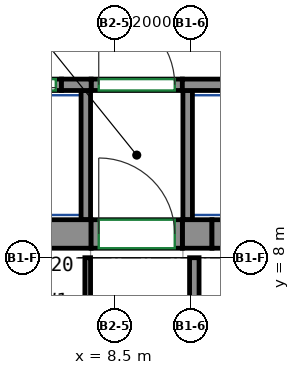
"""IFC4 building model, lengths in metres.
Left out: names, types, materials, properties, quantities, classifications, styles, units other than length and angle.
Written with IfcOpenShell. Run it as: python <this file> out.ifc"""

import sys

from ifc_helpers import new_model, si_unit, direction, frame, frame_2d, origin, place, context, subcontext, project, spatial, rectangle, extrude, source, transform, mapped, element, fill, save


model = new_model("IFC4")
c1 = context("Model", 3, precision=1e-05, world=origin(), true_north=direction((0.0, 1.0)))
c2 = subcontext(c1, "Body", "Model", "MODEL_VIEW")
j1 = project(units=[si_unit("LENGTHUNIT", "METRE"), si_unit("PLANEANGLEUNIT", "RADIAN")], contexts=[c1])
p1 = place(None, origin())
s1 = spatial("IfcSite", under=j1, at=p1, CompositionType="ELEMENT")
p2 = place(p1, origin())
s2 = spatial("IfcBuilding", under=s1, at=p2, CompositionType="ELEMENT")
p3 = place(p2, frame((0.0, 0.0, 199.9)))
s3 = spatial("IfcBuildingStorey", under=s2, at=p3, CompositionType="ELEMENT", Elevation=199.9)
m1 = source(origin(), c2, "Body", "SweptSolid", [
    extrude(rectangle(XDim=14.18, YDim=0.75, at=frame_2d((7.09, 0.0))), origin(), (0.0, 0.0, 1.0), 3.12),
])
p4 = place(p3, frame((-6.29, 8.625, 0.0), z_axis=(0.0, 0.0, 1.0), x_axis=(1.0, 0.0, 0.0)))
e1 = element("IfcWall", 1, at=p4, inside=s3, PredefinedType="SHEAR", context=c2, shape_type="MappedRepresentation", body=[
    mapped(m1, transform((0.0, 0.0, 0.0))),
])
m2 = source(origin(), c2, "Body", "SweptSolid", [
    extrude(rectangle(XDim=0.78, YDim=0.75, at=frame_2d((0.39, 0.0))), origin(), (0.0, 0.0, 1.0), 3.12),
])
p5 = place(p3, frame((10.29, 8.625, 0.0), z_axis=(0.0, 0.0, 1.0), x_axis=(1.0, 0.0, 0.0)))
e2 = element("IfcWall", 2, at=p5, inside=s3, PredefinedType="SHEAR", context=c2, shape_type="MappedRepresentation", body=[
    mapped(m2, transform((0.0, 0.0, 0.0))),
])
m3 = source(origin(), c2, "Body", "SweptSolid", [
    extrude(rectangle(XDim=0.78, YDim=0.3, at=frame_2d((0.39, 0.0))), origin(), (0.0, 0.0, 1.0), 3.12),
])
p6 = place(p3, frame((7.11, 12.55, 0.0), z_axis=(0.0, 0.0, 1.0), x_axis=(1.0, 0.0, 0.0)))
e3 = element("IfcWall", 3, at=p6, inside=s3, PredefinedType="SHEAR", context=c2, shape_type="MappedRepresentation", body=[
    mapped(m3, transform((0.0, 0.0, 0.0))),
])
m4 = source(origin(), c2, "Body", "SweptSolid", [
    extrude(rectangle(XDim=2.82, YDim=0.3, at=frame_2d((1.41, 0.0))), origin(), (0.0, 0.0, 1.0), 3.12),
])
p7 = place(p3, frame((10.29, 12.55, 0.0), z_axis=(0.0, 0.0, 1.0), x_axis=(1.0, 0.0, 0.0)))
e4 = element("IfcWall", 4, at=p7, inside=s3, PredefinedType="SHEAR", context=c2, shape_type="MappedRepresentation", body=[
    mapped(m4, transform((0.0, 0.0, 0.0))),
])
m5 = source(origin(), c2, "Body", "SweptSolid", [
    extrude(rectangle(XDim=1.4, YDim=0.3, at=frame_2d((0.7, 0.0))), origin(), (0.0, 0.0, 1.0), 3.12),
])
p8 = place(p3, frame((5.71, 12.55, 0.0), z_axis=(0.0, 0.0, 1.0), x_axis=(1.0, 0.0, 0.0)))
e5 = element("IfcWall", 5, at=p8, inside=s3, PredefinedType="PARTITIONING", context=c2, shape_type="MappedRepresentation", body=[
    mapped(m5, transform((0.0, 0.0, 0.0))),
])
p9 = place(p8, frame((0.15, 0.0, 0.0)))
e6 = element("IfcOpeningElement", 6, at=p9, cuts=e5, PredefinedType="OPENING", context=c2, shape_type="SweptSolid", body=[
    extrude(rectangle(XDim=1.1, YDim=2.1, at=frame_2d((0.55, 1.05))), frame((0.0, 0.16, 0.0), z_axis=(0.0, -1.0, 0.0), x_axis=(1.0, 0.0, 0.0)), (0.0, 0.0, 1.0), 0.32),
])
m6 = source(origin(), c2, "Body", "SweptSolid", [
    extrude(rectangle(XDim=2.4, YDim=0.3, at=frame_2d((1.2, 0.0))), origin(), (0.0, 0.0, 1.0), 3.12),
])
p10 = place(p3, frame((7.89, 12.55, 0.0), z_axis=(0.0, 0.0, 1.0), x_axis=(1.0, 0.0, 0.0)))
e7 = element("IfcWall", 7, at=p10, inside=s3, PredefinedType="PARTITIONING", context=c2, shape_type="MappedRepresentation", body=[
    mapped(m6, transform((0.0, 0.0, 0.0))),
])
p11 = place(p10, frame((0.2, 0.0, 0.0)))
e8 = element("IfcOpeningElement", 8, at=p11, cuts=e7, PredefinedType="OPENING", context=c2, shape_type="SweptSolid", body=[
    extrude(rectangle(XDim=2.0, YDim=2.1, at=frame_2d((1.0, 1.05))), frame((0.0, 0.16, 0.0), z_axis=(0.0, -1.0, 0.0), x_axis=(1.0, 0.0, 0.0)), (0.0, 0.0, 1.0), 0.32),
])
m7 = source(origin(), c2, "Body", "SweptSolid", [
    extrude(rectangle(XDim=2.65, YDim=0.25, at=frame_2d((1.325, 0.0))), origin(), (0.0, 0.0, 1.0), 3.12),
])
p12 = place(p3, frame((10.605, 5.35, 0.0), z_axis=(0.0, 0.0, 1.0), x_axis=(0.0, 1.0, 0.0)))
e9 = element("IfcWall", 9, at=p12, inside=s3, PredefinedType="PARTITIONING", context=c2, shape_type="MappedRepresentation", body=[
    mapped(m7, transform((0.0, 0.0, 0.0))),
])
m8 = source(origin(), c2, "Body", "SweptSolid", [
    extrude(rectangle(XDim=3.4, YDim=0.25, at=frame_2d((1.7, 0.0))), origin(), (0.0, 0.0, 1.0), 3.12),
])
for number, where, z_axis, x_axis in (
    (10, (10.43, 9.0, 0.0), (0.0, 0.0, 1.0), (0.0, 1.0, 0.0)),
    (11, (7.75, 9.0, 0.0), (0.0, 0.0, 1.0), (0.0, 1.0, 0.0)),
):
    element("IfcWall", number, at=place(p3, frame(where, z_axis=z_axis, x_axis=x_axis)), inside=s3, PredefinedType="PARTITIONING", context=c2, shape_type="MappedRepresentation", body=[
        mapped(m8, transform((0.0, 0.0, 0.0))),
    ])
m9 = source(origin(), c2, "Body", "SweptSolid", [
    extrude(rectangle(XDim=2.4, YDim=0.75, at=frame_2d((1.2, 0.0))), origin(), (0.0, 0.0, 1.0), 2.7),
])
p13 = place(p3, frame((7.89, 8.625, 0.0), z_axis=(0.0, 0.0, 1.0), x_axis=(1.0, 0.0, 0.0)))
e12 = element("IfcWall", 12, at=p13, inside=s3, PredefinedType="PARTITIONING", context=c2, shape_type="MappedRepresentation", body=[
    mapped(m9, transform((0.0, 0.0, 0.0))),
])
p14 = place(p13, frame((0.2, 0.0, 0.0)))
e13 = element("IfcOpeningElement", 13, at=p14, cuts=e12, PredefinedType="OPENING", context=c2, shape_type="SweptSolid", body=[
    extrude(rectangle(XDim=2.0, YDim=2.1, at=frame_2d((1.0, 1.05))), frame((0.0, 0.385, 0.0), z_axis=(0.0, -1.0, 0.0), x_axis=(1.0, 0.0, 0.0)), (0.0, 0.0, 1.0), 0.77),
])
m10 = source(origin(), c2, "Body", "SweptSolid", [
    extrude(rectangle(XDim=1.4, YDim=0.75, at=frame_2d((0.7, 0.0))), origin(), (0.0, 0.0, 1.0), 2.7),
])
p15 = place(p3, frame((11.07, 8.625, 0.0), z_axis=(0.0, 0.0, 1.0), x_axis=(1.0, 0.0, 0.0)))
e14 = element("IfcWall", 14, at=p15, inside=s3, PredefinedType="PARTITIONING", context=c2, shape_type="MappedRepresentation", body=[
    mapped(m10, transform((0.0, 0.0, 0.0))),
])
p16 = place(p15, frame((0.25, 0.0, 0.0)))
e15 = element("IfcOpeningElement", 15, at=p16, cuts=e14, PredefinedType="OPENING", context=c2, shape_type="SweptSolid", body=[
    extrude(rectangle(XDim=0.9, YDim=2.1, at=frame_2d((0.45, 1.05))), frame((0.0, 0.385, 0.0), z_axis=(0.0, -1.0, 0.0), x_axis=(1.0, 0.0, 0.0)), (0.0, 0.0, 1.0), 0.77),
])
p17 = place(p3, frame((7.8, 8.0, 0.0), z_axis=(0.0, 0.0, 1.0), x_axis=(0.0, -1.0, 0.0)))
e16 = element("IfcWall", 16, at=p17, inside=s3, PredefinedType="PARTITIONING", context=c2, shape_type="SweptSolid", body=[
    extrude(rectangle(XDim=2.325, YDim=0.15, at=frame_2d((1.163, 0.0))), origin(), (0.0, 0.0, 1.0), 3.12),
])
p18 = place(p11, origin())
e17 = element("IfcDoor", 17, at=p18, inside=s3, OperationType="DOUBLE_DOOR_SINGLE_SWING", PredefinedType="DOOR", context=c2, shape_type="SweptSolid", body=[
    extrude(rectangle(XDim=2.0, YDim=2.1, at=frame_2d((1.0, 1.05))), frame((0.0, 0.025, 0.0), z_axis=(0.0, -1.0, 0.0), x_axis=(1.0, 0.0, 0.0)), (0.0, 0.0, 1.0), 0.05),
])
fill(e8, e17)
p19 = place(p14, origin())
e18 = element("IfcDoor", 18, at=p19, inside=s3, OperationType="DOUBLE_DOOR_SINGLE_SWING", PredefinedType="DOOR", context=c2, shape_type="SweptSolid", body=[
    extrude(rectangle(XDim=2.0, YDim=2.1, at=frame_2d((1.0, 1.05))), frame((0.0, 0.28, 0.0), z_axis=(0.0, -1.0, 0.0), x_axis=(1.0, 0.0, 0.0)), (0.0, 0.0, 1.0), 0.05),
])
fill(e13, e18)
p20 = place(p9, origin())
e19 = element("IfcDoor", 19, at=p20, inside=s3, OperationType="DOUBLE_DOOR_SLIDING", PredefinedType="DOOR", context=c2, shape_type="SweptSolid", body=[
    extrude(rectangle(XDim=1.1, YDim=2.1, at=frame_2d((0.55, 1.05))), frame((0.0, 0.025, 0.0), z_axis=(0.0, -1.0, 0.0), x_axis=(1.0, 0.0, 0.0)), (0.0, 0.0, 1.0), 0.05),
])
fill(e6, e19)
save(model, sys.argv[1])
